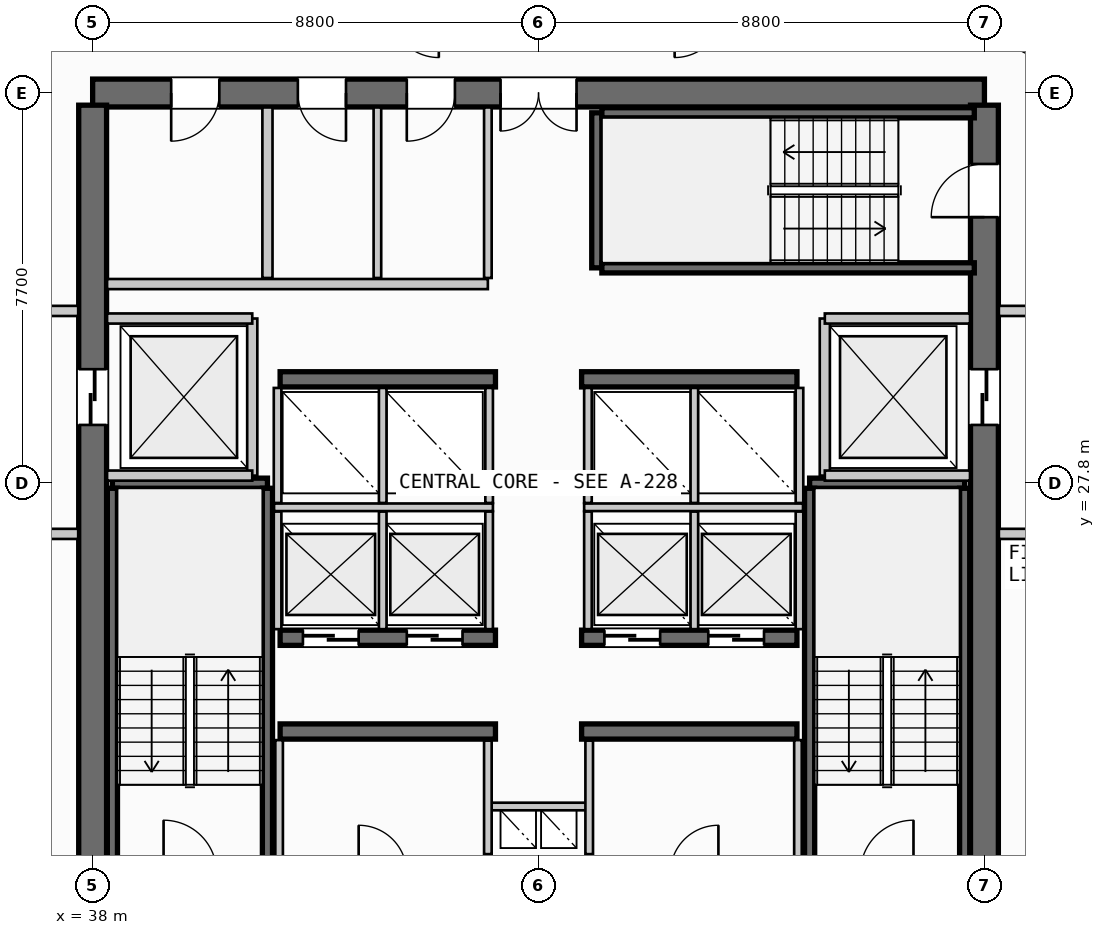
"""IFC4 building model, lengths in metres.
Left out: names, types, materials, properties, quantities, classifications, styles, units other than length and angle.
Written with IfcOpenShell. Run it as: python <this file> out.ifc"""

import sys

from ifc_helpers import new_model, si_unit, direction, frame, frame_2d, origin, place, context, subcontext, project, spatial, rectangle, extrude, source, transform, mapped, element, fill, save


model = new_model("IFC4")
c1 = context("Model", 3, precision=1e-05, world=origin(), true_north=direction((0.0, 1.0)))
c2 = subcontext(c1, "Body", "Model", "MODEL_VIEW")
j1 = project(units=[si_unit("LENGTHUNIT", "METRE"), si_unit("PLANEANGLEUNIT", "RADIAN")], contexts=[c1])
p1 = place(None, origin())
s1 = spatial("IfcSite", under=j1, at=p1, CompositionType="ELEMENT")
p2 = place(p1, origin())
s2 = spatial("IfcBuilding", under=s1, at=p2, CompositionType="ELEMENT")
p3 = place(p2, frame((0.0, 0.0, 204.4)))
s3 = spatial("IfcBuildingStorey", under=s2, at=p3, CompositionType="ELEMENT", Elevation=204.4)
p4 = place(p3, frame((55.6, 35.5, 0.0), z_axis=(0.0, 0.0, 1.0), x_axis=(-1.0, 0.0, 0.0)))
e1 = element("IfcWall", 1, at=p4, inside=s3, PredefinedType="SHEAR", context=c2, shape_type="SweptSolid", body=[
    extrude(rectangle(XDim=17.6, YDim=0.55, at=frame_2d((8.8, 0.0))), origin(), (0.0, 0.0, 1.0), 3.26),
])
p5 = place(p4, frame((8.05, 0.0, 0.0)))
e2 = element("IfcOpeningElement", 2, at=p5, cuts=e1, PredefinedType="OPENING", context=c2, shape_type="SweptSolid", body=[
    extrude(rectangle(XDim=1.5, YDim=2.2, at=frame_2d((0.75, 1.1))), frame((0.0, 0.285, 0.0), z_axis=(0.0, -1.0, 0.0), x_axis=(1.0, 0.0, 0.0)), (0.0, 0.0, 1.0), 0.57),
])
p6 = place(p4, frame((15.1, 0.0, 0.0)))
e3 = element("IfcOpeningElement", 3, at=p6, cuts=e1, PredefinedType="OPENING", context=c2, shape_type="SweptSolid", body=[
    extrude(rectangle(XDim=0.95, YDim=2.15, at=frame_2d((0.475, 1.075))), frame((0.0, 0.285, 0.0), z_axis=(0.0, -1.0, 0.0), x_axis=(1.0, 0.0, 0.0)), (0.0, 0.0, 1.0), 0.57),
])
p7 = place(p4, frame((12.6, 0.0, 0.0)))
e4 = element("IfcOpeningElement", 4, at=p7, cuts=e1, PredefinedType="OPENING", context=c2, shape_type="SweptSolid", body=[
    extrude(rectangle(XDim=0.95, YDim=2.15, at=frame_2d((0.475, 1.075))), frame((0.0, 0.285, 0.0), z_axis=(0.0, -1.0, 0.0), x_axis=(1.0, 0.0, 0.0)), (0.0, 0.0, 1.0), 0.57),
])
p8 = place(p4, frame((10.45, 0.0, 0.0)))
e5 = element("IfcOpeningElement", 5, at=p8, cuts=e1, PredefinedType="OPENING", context=c2, shape_type="SweptSolid", body=[
    extrude(rectangle(XDim=0.95, YDim=2.15, at=frame_2d((0.475, 1.075))), frame((0.0, 0.285, 0.0), z_axis=(0.0, -1.0, 0.0), x_axis=(1.0, 0.0, 0.0)), (0.0, 0.0, 1.0), 0.57),
])
p9 = place(p3, frame((38.0, 35.26, 0.0), z_axis=(0.0, 0.0, 1.0), x_axis=(0.0, -1.0, 0.0)))
e6 = element("IfcWall", 6, at=p9, inside=s3, PredefinedType="SHEAR", context=c2, shape_type="SweptSolid", body=[
    extrude(rectangle(XDim=14.92, YDim=0.55, at=frame_2d((7.46, 0.0))), origin(), (0.0, 0.0, 1.0), 3.26),
])
p10 = place(p9, frame((5.21, 0.0, 0.0)))
e7 = element("IfcOpeningElement", 7, at=p10, cuts=e6, PredefinedType="OPENING", context=c2, shape_type="SweptSolid", body=[
    extrude(rectangle(XDim=1.1, YDim=2.2, at=frame_2d((0.55, 1.1))), frame((0.0, 0.285, 0.0), z_axis=(0.0, -1.0, 0.0), x_axis=(1.0, 0.0, 0.0)), (0.0, 0.0, 1.0), 0.57),
])
p11 = place(p3, frame((55.6, 20.34, 0.0), z_axis=(0.0, 0.0, 1.0), x_axis=(0.0, 1.0, 0.0)))
e8 = element("IfcWall", 8, at=p11, inside=s3, PredefinedType="SHEAR", context=c2, shape_type="SweptSolid", body=[
    extrude(rectangle(XDim=14.92, YDim=0.55, at=frame_2d((7.46, 0.0))), origin(), (0.0, 0.0, 1.0), 3.26),
])
p12 = place(p11, frame((12.71, 0.0, 0.0)))
e9 = element("IfcOpeningElement", 9, at=p12, cuts=e8, PredefinedType="OPENING", context=c2, shape_type="SweptSolid", body=[
    extrude(rectangle(XDim=1.05, YDim=2.15, at=frame_2d((0.525, 1.075))), frame((0.0, 0.285, 0.0), z_axis=(0.0, -1.0, 0.0), x_axis=(1.0, 0.0, 0.0)), (0.0, 0.0, 1.0), 0.57),
])
p13 = place(p11, frame((8.61, 0.0, 0.0)))
e10 = element("IfcOpeningElement", 10, at=p13, cuts=e8, PredefinedType="OPENING", context=c2, shape_type="SweptSolid", body=[
    extrude(rectangle(XDim=1.1, YDim=2.2, at=frame_2d((0.55, 1.1))), frame((0.0, 0.285, 0.0), z_axis=(0.0, -1.0, 0.0), x_axis=(1.0, 0.0, 0.0)), (0.0, 0.0, 1.0), 0.57),
])
for number, where, z_axis, x_axis in (
    (11, (41.7, 22.9, 0.0), (0.0, 0.0, 1.0), (1.0, 0.0, 0.0)),
    (12, (47.65, 22.9, 0.0), (0.0, 0.0, 1.0), (1.0, 0.0, 0.0)),
):
    element("IfcWall", number, at=place(p3, frame(where, z_axis=z_axis, x_axis=x_axis)), inside=s3, PredefinedType="SHEAR", context=c2, shape_type="SweptSolid", body=[
        extrude(rectangle(XDim=4.25, YDim=0.3, at=frame_2d((2.125, 0.0))), origin(), (0.0, 0.0, 1.0), 3.26),
    ])
p14 = place(p3, frame((41.7, 24.75, 0.0), z_axis=(0.0, 0.0, 1.0), x_axis=(1.0, 0.0, 0.0)))
e13 = element("IfcWall", 13, at=p14, inside=s3, PredefinedType="SHEAR", context=c2, shape_type="SweptSolid", body=[
    extrude(rectangle(XDim=4.25, YDim=0.3, at=frame_2d((2.125, 0.0))), origin(), (0.0, 0.0, 1.0), 3.26),
])
p15 = place(p14, frame((0.45, 0.0, 0.0)))
e14 = element("IfcOpeningElement", 14, at=p15, cuts=e13, PredefinedType="OPENING", context=c2, shape_type="SweptSolid", body=[
    extrude(rectangle(XDim=1.1, YDim=2.2, at=frame_2d((0.55, 1.1))), frame((0.0, 0.16, 0.0), z_axis=(0.0, -1.0, 0.0), x_axis=(1.0, 0.0, 0.0)), (0.0, 0.0, 1.0), 0.32),
])
p16 = place(p14, frame((2.5, 0.0, 0.0)))
e15 = element("IfcOpeningElement", 15, at=p16, cuts=e13, PredefinedType="OPENING", context=c2, shape_type="SweptSolid", body=[
    extrude(rectangle(XDim=1.1, YDim=2.2, at=frame_2d((0.55, 1.1))), frame((0.0, 0.16, 0.0), z_axis=(0.0, -1.0, 0.0), x_axis=(1.0, 0.0, 0.0)), (0.0, 0.0, 1.0), 0.32),
])
p17 = place(p3, frame((47.65, 24.75, 0.0), z_axis=(0.0, 0.0, 1.0), x_axis=(1.0, 0.0, 0.0)))
e16 = element("IfcWall", 16, at=p17, inside=s3, PredefinedType="SHEAR", context=c2, shape_type="SweptSolid", body=[
    extrude(rectangle(XDim=4.25, YDim=0.3, at=frame_2d((2.125, 0.0))), origin(), (0.0, 0.0, 1.0), 3.26),
])
p18 = place(p17, frame((0.45, 0.0, 0.0)))
e17 = element("IfcOpeningElement", 17, at=p18, cuts=e16, PredefinedType="OPENING", context=c2, shape_type="SweptSolid", body=[
    extrude(rectangle(XDim=1.1, YDim=2.2, at=frame_2d((0.55, 1.1))), frame((0.0, 0.16, 0.0), z_axis=(0.0, -1.0, 0.0), x_axis=(1.0, 0.0, 0.0)), (0.0, 0.0, 1.0), 0.32),
])
p19 = place(p17, frame((2.5, 0.0, 0.0)))
e18 = element("IfcOpeningElement", 18, at=p19, cuts=e16, PredefinedType="OPENING", context=c2, shape_type="SweptSolid", body=[
    extrude(rectangle(XDim=1.1, YDim=2.2, at=frame_2d((0.55, 1.1))), frame((0.0, 0.16, 0.0), z_axis=(0.0, -1.0, 0.0), x_axis=(1.0, 0.0, 0.0)), (0.0, 0.0, 1.0), 0.32),
])
for number, where, z_axis, x_axis in (
    (19, (41.7, 29.85, 0.0), (0.0, 0.0, 1.0), (1.0, 0.0, 0.0)),
    (20, (47.65, 29.85, 0.0), (0.0, 0.0, 1.0), (1.0, 0.0, 0.0)),
):
    element("IfcWall", number, at=place(p3, frame(where, z_axis=z_axis, x_axis=x_axis)), inside=s3, PredefinedType="SHEAR", context=c2, shape_type="SweptSolid", body=[
        extrude(rectangle(XDim=4.25, YDim=0.3, at=frame_2d((2.125, 0.0))), origin(), (0.0, 0.0, 1.0), 3.26),
    ])
p20 = place(p3, frame((38.39, 27.8, 0.0), z_axis=(0.0, 0.0, 1.0), x_axis=(1.0, 0.0, 0.0)))
e21 = element("IfcWall", 21, at=p20, inside=s3, PredefinedType="SHEAR", context=c2, shape_type="SweptSolid", body=[
    extrude(rectangle(XDim=3.06, YDim=0.2, at=frame_2d((1.53, 0.0))), origin(), (0.0, 0.0, 1.0), 3.26),
])
for number, where, z_axis, x_axis in (
    (22, (41.45, 27.7, 0.0), (0.0, 0.0, 1.0), (0.0, -1.0, 0.0)),
    (23, (38.39, 20.35, 0.0), (0.0, 0.0, 1.0), (0.0, 1.0, 0.0)),
):
    element("IfcWall", number, at=place(p3, frame(where, z_axis=z_axis, x_axis=x_axis)), inside=s3, PredefinedType="SHEAR", context=c2, shape_type="SweptSolid", body=[
        extrude(rectangle(XDim=7.35, YDim=0.2, at=frame_2d((3.675, 0.0))), origin(), (0.0, 0.0, 1.0), 3.26),
    ])
p21 = place(p3, frame((52.15, 27.8, 0.0), z_axis=(0.0, 0.0, 1.0), x_axis=(1.0, 0.0, 0.0)))
e24 = element("IfcWall", 24, at=p21, inside=s3, PredefinedType="SHEAR", context=c2, shape_type="SweptSolid", body=[
    extrude(rectangle(XDim=3.06, YDim=0.2, at=frame_2d((1.53, 0.0))), origin(), (0.0, 0.0, 1.0), 3.26),
])
for number, where, z_axis, x_axis in (
    (25, (55.21, 27.7, 0.0), (0.0, 0.0, 1.0), (0.0, -1.0, 0.0)),
    (26, (52.15, 20.35, 0.0), (0.0, 0.0, 1.0), (0.0, 1.0, 0.0)),
):
    element("IfcWall", number, at=place(p3, frame(where, z_axis=z_axis, x_axis=x_axis)), inside=s3, PredefinedType="SHEAR", context=c2, shape_type="SweptSolid", body=[
        extrude(rectangle(XDim=7.35, YDim=0.2, at=frame_2d((3.675, 0.0))), origin(), (0.0, 0.0, 1.0), 3.26),
    ])
p22 = place(p3, frame((47.95, 32.05, 0.0), z_axis=(0.0, 0.0, 1.0), x_axis=(0.0, 1.0, 0.0)))
e27 = element("IfcWall", 27, at=p22, inside=s3, PredefinedType="SHEAR", context=c2, shape_type="SweptSolid", body=[
    extrude(rectangle(XDim=3.06, YDim=0.2, at=frame_2d((1.53, 0.0))), origin(), (0.0, 0.0, 1.0), 3.26),
])
for number, where, z_axis, x_axis in (
    (28, (48.05, 35.11, 0.0), (0.0, 0.0, 1.0), (1.0, 0.0, 0.0)),
    (29, (55.4, 32.05, 0.0), (0.0, 0.0, 1.0), (-1.0, 0.0, 0.0)),
):
    element("IfcWall", number, at=place(p3, frame(where, z_axis=z_axis, x_axis=x_axis)), inside=s3, PredefinedType="SHEAR", context=c2, shape_type="SweptSolid", body=[
        extrude(rectangle(XDim=7.35, YDim=0.2, at=frame_2d((3.675, 0.0))), origin(), (0.0, 0.0, 1.0), 3.26),
    ])
p23 = place(p3, frame((45.8, 21.42, 0.0), z_axis=(0.0, 0.0, 1.0), x_axis=(1.0, 0.0, 0.0)))
e30 = element("IfcWall", 30, at=p23, inside=s3, PredefinedType="PARTITIONING", context=c2, shape_type="SweptSolid", body=[
    extrude(rectangle(XDim=2.0, YDim=0.15, at=frame_2d((1.0, 0.0))), origin(), (0.0, 0.0, 1.0), 2.595),
])
for number, where, z_axis, x_axis in (
    (31, (45.8, 20.48, 0.0), (0.0, 0.0, 1.0), (0.0, 1.0, 0.0)),
    (32, (47.8, 20.48, 0.0), (0.0, 0.0, 1.0), (0.0, 1.0, 0.0)),
):
    element("IfcWall", number, at=place(p3, frame(where, z_axis=z_axis, x_axis=x_axis)), inside=s3, PredefinedType="PARTITIONING", context=c2, shape_type="SweptSolid", body=[
        extrude(rectangle(XDim=2.24, YDim=0.15, at=frame_2d((1.12, 0.0))), origin(), (0.0, 0.0, 1.0), 2.595),
    ])
p24 = place(p3, frame((41.15, 27.95, 0.0), z_axis=(0.0, 0.0, 1.0), x_axis=(0.0, 1.0, 0.0)))
e33 = element("IfcWall", 33, at=p24, inside=s3, PredefinedType="PARTITIONING", context=c2, shape_type="SweptSolid", body=[
    extrude(rectangle(XDim=3.1, YDim=0.2, at=frame_2d((1.55, 0.0))), origin(), (0.0, 0.0, 1.0), 2.595),
])
for number, where, z_axis, x_axis in (
    (34, (38.285, 27.95, 0.0), (0.0, 0.0, 1.0), (1.0, 0.0, 0.0)),
    (35, (38.285, 31.05, 0.0), (0.0, 0.0, 1.0), (1.0, 0.0, 0.0)),
):
    element("IfcWall", number, at=place(p3, frame(where, z_axis=z_axis, x_axis=x_axis)), inside=s3, PredefinedType="PARTITIONING", context=c2, shape_type="SweptSolid", body=[
        extrude(rectangle(XDim=2.865, YDim=0.2, at=frame_2d((1.433, 0.0))), origin(), (0.0, 0.0, 1.0), 2.595),
    ])
for number, where, z_axis, x_axis in (
    (36, (34.5, 26.8, 0.0), (0.0, 0.0, 1.0), (1.0, 0.0, 0.0)),
    (37, (34.5, 31.2, 0.0), (0.0, 0.0, 1.0), (1.0, 0.0, 0.0)),
):
    element("IfcWall", number, at=place(p3, frame(where, z_axis=z_axis, x_axis=x_axis)), inside=s3, PredefinedType="PARTITIONING", context=c2, shape_type="SweptSolid", body=[
        extrude(rectangle(XDim=3.215, YDim=0.2, at=frame_2d((1.607, 0.0))), origin(), (0.0, 0.0, 1.0), 2.595),
    ])
p25 = place(p3, frame((52.45, 27.95, 0.0), z_axis=(0.0, 0.0, 1.0), x_axis=(0.0, 1.0, 0.0)))
e38 = element("IfcWall", 38, at=p25, inside=s3, PredefinedType="PARTITIONING", context=c2, shape_type="SweptSolid", body=[
    extrude(rectangle(XDim=3.1, YDim=0.2, at=frame_2d((1.55, 0.0))), origin(), (0.0, 0.0, 1.0), 2.595),
])
for number, where, z_axis, x_axis in (
    (39, (52.45, 27.95, 0.0), (0.0, 0.0, 1.0), (1.0, 0.0, 0.0)),
    (40, (52.45, 31.05, 0.0), (0.0, 0.0, 1.0), (1.0, 0.0, 0.0)),
):
    element("IfcWall", number, at=place(p3, frame(where, z_axis=z_axis, x_axis=x_axis)), inside=s3, PredefinedType="PARTITIONING", context=c2, shape_type="SweptSolid", body=[
        extrude(rectangle(XDim=2.865, YDim=0.2, at=frame_2d((1.433, 0.0))), origin(), (0.0, 0.0, 1.0), 2.595),
    ])
for number, where, z_axis, x_axis in (
    (41, (55.885, 26.8, 0.0), (0.0, 0.0, 1.0), (1.0, 0.0, 0.0)),
    (42, (55.885, 31.2, 0.0), (0.0, 0.0, 1.0), (1.0, 0.0, 0.0)),
):
    element("IfcWall", number, at=place(p3, frame(where, z_axis=z_axis, x_axis=x_axis)), inside=s3, PredefinedType="PARTITIONING", context=c2, shape_type="SweptSolid", body=[
        extrude(rectangle(XDim=3.215, YDim=0.2, at=frame_2d((1.607, 0.0))), origin(), (0.0, 0.0, 1.0), 2.595),
    ])
for number, where, z_axis, x_axis in (
    (43, (41.68, 20.385, 0.0), (0.0, 0.0, 1.0), (0.0, 1.0, 0.0)),
    (44, (51.92, 20.385, 0.0), (0.0, 0.0, 1.0), (0.0, 1.0, 0.0)),
):
    element("IfcWall", number, at=place(p3, frame(where, z_axis=z_axis, x_axis=x_axis)), inside=s3, PredefinedType="PARTITIONING", context=c2, shape_type="SweptSolid", body=[
        extrude(rectangle(XDim=2.345, YDim=0.15, at=frame_2d((1.172, 0.0))), origin(), (0.0, 0.0, 1.0), 2.595),
    ])
p26 = place(p3, frame((41.58, 27.325, 0.0), z_axis=(0.0, 0.0, 1.0), x_axis=(1.0, 0.0, 0.0)))
e45 = element("IfcWall", 45, at=p26, inside=s3, PredefinedType="PARTITIONING", context=c2, shape_type="SweptSolid", body=[
    extrude(rectangle(XDim=4.32, YDim=0.15, at=frame_2d((2.16, 0.0))), origin(), (0.0, 0.0, 1.0), 2.595),
])
p27 = place(p3, frame((47.7, 27.325, 0.0), z_axis=(0.0, 0.0, 1.0), x_axis=(1.0, 0.0, 0.0)))
e46 = element("IfcWall", 46, at=p27, inside=s3, PredefinedType="PARTITIONING", context=c2, shape_type="SweptSolid", body=[
    extrude(rectangle(XDim=4.32, YDim=0.15, at=frame_2d((2.16, 0.0))), origin(), (0.0, 0.0, 1.0), 2.595),
])
for number, where, z_axis, x_axis in (
    (47, (41.65, 24.92, 0.0), (0.0, 0.0, 1.0), (0.0, 1.0, 0.0)),
    (48, (43.725, 24.92, 0.0), (0.0, 0.0, 1.0), (0.0, 1.0, 0.0)),
    (49, (45.825, 24.92, 0.0), (0.0, 0.0, 1.0), (0.0, 1.0, 0.0)),
    (50, (47.775, 24.92, 0.0), (0.0, 0.0, 1.0), (0.0, 1.0, 0.0)),
    (51, (49.875, 24.92, 0.0), (0.0, 0.0, 1.0), (0.0, 1.0, 0.0)),
    (52, (51.95, 24.92, 0.0), (0.0, 0.0, 1.0), (0.0, 1.0, 0.0)),
):
    element("IfcWall", number, at=place(p3, frame(where, z_axis=z_axis, x_axis=x_axis)), inside=s3, PredefinedType="PARTITIONING", context=c2, shape_type="SweptSolid", body=[
        extrude(rectangle(XDim=2.32, YDim=0.15, at=frame_2d((1.16, 0.0))), origin(), (0.0, 0.0, 1.0), 2.595),
    ])
for number, where, z_axis, x_axis in (
    (53, (41.65, 27.41, 0.0), (0.0, 0.0, 1.0), (0.0, 1.0, 0.0)),
    (54, (43.725, 27.41, 0.0), (0.0, 0.0, 1.0), (0.0, 1.0, 0.0)),
    (55, (45.825, 27.41, 0.0), (0.0, 0.0, 1.0), (0.0, 1.0, 0.0)),
    (56, (47.775, 27.41, 0.0), (0.0, 0.0, 1.0), (0.0, 1.0, 0.0)),
    (57, (49.875, 27.41, 0.0), (0.0, 0.0, 1.0), (0.0, 1.0, 0.0)),
    (58, (51.95, 27.41, 0.0), (0.0, 0.0, 1.0), (0.0, 1.0, 0.0)),
):
    element("IfcWall", number, at=place(p3, frame(where, z_axis=z_axis, x_axis=x_axis)), inside=s3, PredefinedType="PARTITIONING", context=c2, shape_type="SweptSolid", body=[
        extrude(rectangle(XDim=2.27, YDim=0.15, at=frame_2d((1.135, 0.0))), origin(), (0.0, 0.0, 1.0), 2.595),
    ])
p28 = place(p3, frame((41.45, 31.85, 0.0), z_axis=(0.0, 0.0, 1.0), x_axis=(0.0, 1.0, 0.0)))
e59 = element("IfcWall", 59, at=p28, inside=s3, PredefinedType="PARTITIONING", context=c2, shape_type="SweptSolid", body=[
    extrude(rectangle(XDim=3.365, YDim=0.2, at=frame_2d((1.683, 0.0))), origin(), (0.0, 0.0, 1.0), 2.595),
])
p29 = place(p3, frame((38.285, 31.73, 0.0), z_axis=(0.0, 0.0, 1.0), x_axis=(1.0, 0.0, 0.0)))
e60 = element("IfcWall", 60, at=p29, inside=s3, PredefinedType="PARTITIONING", context=c2, shape_type="SweptSolid", body=[
    extrude(rectangle(XDim=7.515, YDim=0.2, at=frame_2d((3.758, 0.0))), origin(), (0.0, 0.0, 1.0), 2.595),
])
p30 = place(p3, frame((45.8, 31.85, 0.0), z_axis=(0.0, 0.0, 1.0), x_axis=(0.0, 1.0, 0.0)))
e61 = element("IfcWall", 61, at=p30, inside=s3, PredefinedType="PARTITIONING", context=c2, shape_type="SweptSolid", body=[
    extrude(rectangle(XDim=3.365, YDim=0.15, at=frame_2d((1.683, 0.0))), origin(), (0.0, 0.0, 1.0), 2.595),
])
p31 = place(p3, frame((43.62, 31.85, 0.0), z_axis=(0.0, 0.0, 1.0), x_axis=(0.0, 1.0, 0.0)))
e62 = element("IfcWall", 62, at=p31, inside=s3, PredefinedType="PLUMBINGWALL", context=c2, shape_type="SweptSolid", body=[
    extrude(rectangle(XDim=3.365, YDim=0.15, at=frame_2d((1.683, 0.0))), origin(), (0.0, 0.0, 1.0), 2.595),
])
m1 = source(origin(), c2, "Body", "SweptSolid", [
    extrude(rectangle(XDim=1.05, YDim=2.15, at=frame_2d((0.525, 1.075))), frame((0.0, 0.025, 0.0), z_axis=(0.0, -1.0, 0.0), x_axis=(1.0, 0.0, 0.0)), (0.0, 0.0, 1.0), 0.05),
])
p32 = place(p12, origin())
e63 = element("IfcDoor", 63, at=p32, inside=s3, OperationType="SINGLE_SWING_LEFT", PredefinedType="DOOR", context=c2, shape_type="MappedRepresentation", body=[
    mapped(m1, transform((0.0, 0.0, 0.0), scale=1.0)),
])
fill(e9, e63)
m2 = source(origin(), c2, "Body", "SweptSolid", [
    extrude(rectangle(XDim=1.5, YDim=2.2, at=frame_2d((0.75, 1.1))), frame((0.0, 0.025, 0.0), z_axis=(0.0, -1.0, 0.0), x_axis=(1.0, 0.0, 0.0)), (0.0, 0.0, 1.0), 0.05),
])
p33 = place(p5, origin())
e64 = element("IfcDoor", 64, at=p33, inside=s3, OperationType="DOUBLE_DOOR_SINGLE_SWING", PredefinedType="DOOR", context=c2, shape_type="MappedRepresentation", body=[
    mapped(m2, transform((0.0, 0.0, 0.0), scale=1.0)),
])
fill(e2, e64)
m3 = source(origin(), c2, "Body", "SweptSolid", [
    extrude(rectangle(XDim=1.1, YDim=2.2, at=frame_2d((0.55, 1.1))), frame((0.0, 0.025, 0.0), z_axis=(0.0, -1.0, 0.0), x_axis=(1.0, 0.0, 0.0)), (0.0, 0.0, 1.0), 0.05),
])
p34 = place(p10, origin())
e65 = element("IfcDoor", 65, at=p34, inside=s3, OperationType="SLIDING_TO_LEFT", PredefinedType="DOOR", context=c2, shape_type="MappedRepresentation", body=[
    mapped(m3, transform((0.0, 0.0, 0.0), scale=1.0)),
])
fill(e7, e65)
p35 = place(p13, origin())
e66 = element("IfcDoor", 66, at=p35, inside=s3, OperationType="SLIDING_TO_RIGHT", PredefinedType="DOOR", context=c2, shape_type="MappedRepresentation", body=[
    mapped(m3, transform((0.0, 0.0, 0.0), scale=1.0)),
])
fill(e10, e66)
p36 = place(p15, origin())
e67 = element("IfcDoor", 67, at=p36, inside=s3, OperationType="SLIDING_TO_RIGHT", PredefinedType="DOOR", context=c2, shape_type="MappedRepresentation", body=[
    mapped(m3, transform((0.0, 0.0, 0.0), scale=1.0)),
])
fill(e14, e67)
p37 = place(p16, origin())
e68 = element("IfcDoor", 68, at=p37, inside=s3, OperationType="SLIDING_TO_RIGHT", PredefinedType="DOOR", context=c2, shape_type="MappedRepresentation", body=[
    mapped(m3, transform((0.0, 0.0, 0.0), scale=1.0)),
])
fill(e15, e68)
p38 = place(p18, origin())
e69 = element("IfcDoor", 69, at=p38, inside=s3, OperationType="SLIDING_TO_RIGHT", PredefinedType="DOOR", context=c2, shape_type="MappedRepresentation", body=[
    mapped(m3, transform((0.0, 0.0, 0.0), scale=1.0)),
])
fill(e17, e69)
p39 = place(p19, origin())
e70 = element("IfcDoor", 70, at=p39, inside=s3, OperationType="SLIDING_TO_RIGHT", PredefinedType="DOOR", context=c2, shape_type="MappedRepresentation", body=[
    mapped(m3, transform((0.0, 0.0, 0.0), scale=1.0)),
])
fill(e18, e70)
m4 = source(origin(), c2, "Body", "SweptSolid", [
    extrude(rectangle(XDim=0.95, YDim=2.15, at=frame_2d((0.475, 1.075))), frame((0.0, 0.025, 0.0), z_axis=(0.0, -1.0, 0.0), x_axis=(1.0, 0.0, 0.0)), (0.0, 0.0, 1.0), 0.05),
])
p40 = place(p6, origin())
e71 = element("IfcDoor", 71, at=p40, inside=s3, OperationType="SINGLE_SWING_RIGHT", PredefinedType="DOOR", context=c2, shape_type="MappedRepresentation", body=[
    mapped(m4, transform((0.0, 0.0, 0.0), scale=1.0)),
])
fill(e3, e71)
p41 = place(p7, origin())
e72 = element("IfcDoor", 72, at=p41, inside=s3, OperationType="SINGLE_SWING_LEFT", PredefinedType="DOOR", context=c2, shape_type="MappedRepresentation", body=[
    mapped(m4, transform((0.0, 0.0, 0.0), scale=1.0)),
])
fill(e4, e72)
p42 = place(p8, origin())
e73 = element("IfcDoor", 73, at=p42, inside=s3, OperationType="SINGLE_SWING_RIGHT", PredefinedType="DOOR", context=c2, shape_type="MappedRepresentation", body=[
    mapped(m4, transform((0.0, 0.0, 0.0), scale=1.0)),
])
fill(e5, e73)
save(model, sys.argv[1])
